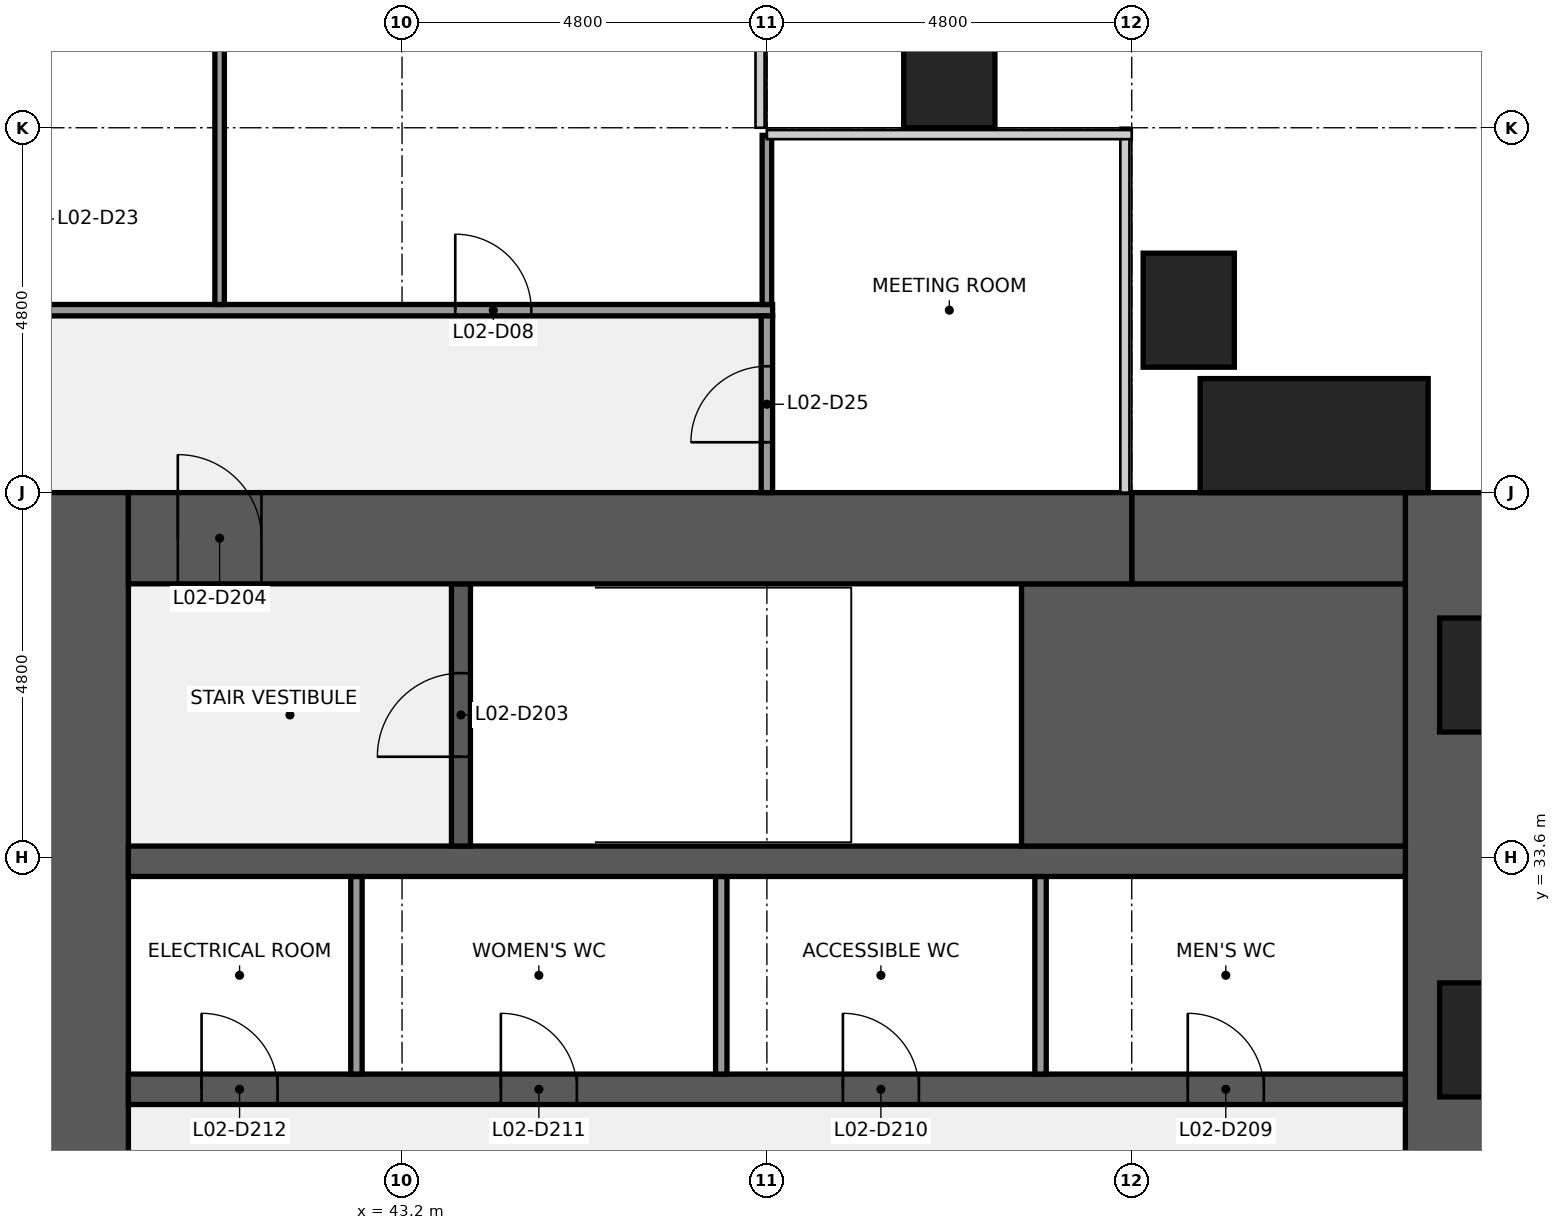
"""IFC4 building model, lengths in metres.
Left out: names, types, materials, properties, quantities, classifications, styles, units other than length and angle.
Written with IfcOpenShell. Run it as: python <this file> out.ifc"""

import sys

from ifc_helpers import new_model, si_unit, direction, frame, frame_2d, origin, origin_2d, place, context, subcontext, project, spatial, rectangle, extrude, element, fill, save


model = new_model("IFC4")
c1 = context("Model", 3, precision=1e-05, world=origin(), true_north=direction((0.0, 1.0)))
c2 = subcontext(c1, "Body", "Model", "MODEL_VIEW")
j1 = project(units=[si_unit("LENGTHUNIT", "METRE"), si_unit("PLANEANGLEUNIT", "RADIAN")], contexts=[c1])
p1 = place(None, origin())
s1 = spatial("IfcSite", under=j1, at=p1, CompositionType="ELEMENT")
p2 = place(p1, origin())
s2 = spatial("IfcBuilding", under=s1, at=p2, CompositionType="ELEMENT")
p3 = place(p2, frame((0.0, 0.0, 17.0)))
s3 = spatial("IfcBuildingStorey", under=s2, at=p3, CompositionType="ELEMENT", Elevation=17.0)
p4 = place(p3, frame((57.0, 38.4, 0.0), z_axis=(0.0, 0.0, 1.0), x_axis=(0.0, -1.0, 0.0)))
e1 = element("IfcWall", 1, at=p4, inside=s3, PredefinedType="SHEAR", context=c2, shape_type="SweptSolid", body=[
    extrude(rectangle(XDim=28.8, YDim=1.2, at=frame_2d((14.4, 0.0))), origin(), (0.0, 0.0, 1.0), 4.24),
])
p5 = place(p4, frame((18.45, 0.0, 0.9)))
e2 = element("IfcOpeningElement", 2, at=p5, cuts=e1, PredefinedType="OPENING", context=c2, shape_type="SweptSolid", body=[
    extrude(rectangle(XDim=1.5, YDim=1.5, at=frame_2d((0.75, 0.75))), frame((0.0, 0.61, 0.0), z_axis=(0.0, -1.0, 0.0), x_axis=(1.0, 0.0, 0.0)), (0.0, 0.0, 1.0), 1.22),
])
p6 = place(p4, frame((8.85, 0.0, 0.9)))
e3 = element("IfcOpeningElement", 3, at=p6, cuts=e1, PredefinedType="OPENING", context=c2, shape_type="SweptSolid", body=[
    extrude(rectangle(XDim=1.5, YDim=1.5, at=frame_2d((0.75, 0.75))), frame((0.0, 0.61, 0.0), z_axis=(0.0, -1.0, 0.0), x_axis=(1.0, 0.0, 0.0)), (0.0, 0.0, 1.0), 1.22),
])
p7 = place(p3, frame((39.0, 9.6, 0.0), z_axis=(0.0, 0.0, 1.0), x_axis=(0.0, 1.0, 0.0)))
e4 = element("IfcWall", 4, at=p7, inside=s3, PredefinedType="SHEAR", context=c2, shape_type="SweptSolid", body=[
    extrude(rectangle(XDim=28.8, YDim=1.2, at=frame_2d((14.4, 0.0))), origin(), (0.0, 0.0, 1.0), 4.24),
])
p8 = place(p7, frame((8.7, 0.0, 0.0)))
e5 = element("IfcOpeningElement", 5, at=p8, cuts=e4, PredefinedType="OPENING", context=c2, shape_type="SweptSolid", body=[
    extrude(rectangle(XDim=1.8, YDim=2.1, at=frame_2d((0.9, 1.05))), frame((0.0, 0.61, 0.0), z_axis=(0.0, -1.0, 0.0), x_axis=(1.0, 0.0, 0.0)), (0.0, 0.0, 1.0), 1.22),
])
p9 = place(p7, frame((18.3, 0.0, 0.0)))
e6 = element("IfcOpeningElement", 6, at=p9, cuts=e4, PredefinedType="OPENING", context=c2, shape_type="SweptSolid", body=[
    extrude(rectangle(XDim=1.8, YDim=2.1, at=frame_2d((0.9, 1.05))), frame((0.0, 0.61, 0.0), z_axis=(0.0, -1.0, 0.0), x_axis=(1.0, 0.0, 0.0)), (0.0, 0.0, 1.0), 1.22),
])
p10 = place(p3, frame((39.6, 30.55, 0.0), z_axis=(0.0, 0.0, 1.0), x_axis=(1.0, 0.0, 0.0)))
e7 = element("IfcWall", 7, at=p10, inside=s3, PredefinedType="SHEAR", context=c2, shape_type="SweptSolid", body=[
    extrude(rectangle(XDim=16.8, YDim=0.4, at=frame_2d((8.4, 0.0))), origin(), (0.0, 0.0, 1.0), 4.24),
])
p11 = place(p10, frame((13.938, 0.0, 0.0)))
e8 = element("IfcOpeningElement", 8, at=p11, cuts=e7, PredefinedType="OPENING", context=c2, shape_type="SweptSolid", body=[
    extrude(rectangle(XDim=1.0, YDim=2.1, at=frame_2d((0.5, 1.05))), frame((0.0, 0.21, 0.0), z_axis=(0.0, -1.0, 0.0), x_axis=(1.0, 0.0, 0.0)), (0.0, 0.0, 1.0), 0.42),
])
p12 = place(p10, frame((9.4, 0.0, 0.0)))
e9 = element("IfcOpeningElement", 9, at=p12, cuts=e7, PredefinedType="OPENING", context=c2, shape_type="SweptSolid", body=[
    extrude(rectangle(XDim=1.0, YDim=2.1, at=frame_2d((0.5, 1.05))), frame((0.0, 0.21, 0.0), z_axis=(0.0, -1.0, 0.0), x_axis=(1.0, 0.0, 0.0)), (0.0, 0.0, 1.0), 0.42),
])
p13 = place(p10, frame((4.9, 0.0, 0.0)))
e10 = element("IfcOpeningElement", 10, at=p13, cuts=e7, PredefinedType="OPENING", context=c2, shape_type="SweptSolid", body=[
    extrude(rectangle(XDim=1.0, YDim=2.1, at=frame_2d((0.5, 1.05))), frame((0.0, 0.21, 0.0), z_axis=(0.0, -1.0, 0.0), x_axis=(1.0, 0.0, 0.0)), (0.0, 0.0, 1.0), 0.42),
])
p14 = place(p10, frame((0.962, 0.0, 0.0)))
e11 = element("IfcOpeningElement", 11, at=p14, cuts=e7, PredefinedType="OPENING", context=c2, shape_type="SweptSolid", body=[
    extrude(rectangle(XDim=1.0, YDim=2.1, at=frame_2d((0.5, 1.05))), frame((0.0, 0.21, 0.0), z_axis=(0.0, -1.0, 0.0), x_axis=(1.0, 0.0, 0.0)), (0.0, 0.0, 1.0), 0.42),
])
for number, where, z_axis, x_axis in (
    (12, (51.6, 30.75, 0.0), (0.0, 0.0, 1.0), (0.0, 1.0, 0.0)),
    (13, (47.4, 30.75, 0.0), (0.0, 0.0, 1.0), (0.0, 1.0, 0.0)),
    (14, (42.6, 30.75, 0.0), (0.0, 0.0, 1.0), (0.0, 1.0, 0.0)),
):
    element("IfcWall", number, at=place(p3, frame(where, z_axis=z_axis, x_axis=x_axis)), inside=s3, PredefinedType="PARTITIONING", context=c2, shape_type="SweptSolid", body=[
        extrude(rectangle(XDim=2.6, YDim=0.15, at=frame_2d((1.3, 0.0))), origin(), (0.0, 0.0, 1.0), 4.24),
    ])
p15 = place(p3, frame((39.6, 33.55, 0.0), z_axis=(0.0, 0.0, 1.0), x_axis=(1.0, 0.0, 0.0)))
e15 = element("IfcWall", 15, at=p15, inside=s3, PredefinedType="SHEAR", context=c2, shape_type="SweptSolid", body=[
    extrude(rectangle(XDim=16.8, YDim=0.4, at=frame_2d((8.4, 0.0))), origin(), (0.0, 0.0, 1.0), 4.24),
])
p16 = place(p3, frame((51.35, 35.475, 0.0), z_axis=(0.0, 0.0, 1.0), x_axis=(1.0, 0.0, 0.0)))
e16 = element("IfcWall", 16, at=p16, inside=s3, PredefinedType="SHEAR", context=c2, shape_type="SweptSolid", body=[
    extrude(rectangle(XDim=5.05, YDim=3.45, at=frame_2d((2.525, 0.0))), origin(), (0.0, 0.0, 1.0), 4.24),
])
p17 = place(p3, frame((43.975, 33.75, 0.0), z_axis=(0.0, 0.0, 1.0), x_axis=(0.0, 1.0, 0.0)))
e17 = element("IfcWall", 17, at=p17, inside=s3, PredefinedType="SHEAR", context=c2, shape_type="SweptSolid", body=[
    extrude(rectangle(XDim=3.45, YDim=0.25, at=frame_2d((1.725, 0.0))), origin(), (0.0, 0.0, 1.0), 4.24),
])
p18 = place(p17, frame((1.175, 0.0, 0.0)))
e18 = element("IfcOpeningElement", 18, at=p18, cuts=e17, PredefinedType="OPENING", context=c2, shape_type="SweptSolid", body=[
    extrude(rectangle(XDim=1.1, YDim=2.1, at=frame_2d((0.55, 1.05))), frame((0.0, 0.135, 0.0), z_axis=(0.0, -1.0, 0.0), x_axis=(1.0, 0.0, 0.0)), (0.0, 0.0, 1.0), 0.27),
])
p19 = place(p3, frame((52.8, 37.8, 0.0), z_axis=(0.0, 0.0, 1.0), x_axis=(1.0, 0.0, 0.0)))
e19 = element("IfcWall", 19, at=p19, inside=s3, PredefinedType="SHEAR", context=c2, shape_type="SweptSolid", body=[
    extrude(rectangle(XDim=3.6, YDim=1.2, at=frame_2d((1.8, 0.0))), origin(), (0.0, 0.0, 1.0), 4.24),
])
p20 = place(p3, frame((39.6, 37.8, 0.0), z_axis=(0.0, 0.0, 1.0), x_axis=(1.0, 0.0, 0.0)))
e20 = element("IfcWall", 20, at=p20, inside=s3, PredefinedType="SHEAR", context=c2, shape_type="SweptSolid", body=[
    extrude(rectangle(XDim=13.2, YDim=1.2, at=frame_2d((6.6, 0.0))), origin(), (0.0, 0.0, 1.0), 4.24),
])
p21 = place(p20, frame((0.65, 0.0, 0.0)))
e21 = element("IfcOpeningElement", 21, at=p21, cuts=e20, PredefinedType="OPENING", context=c2, shape_type="SweptSolid", body=[
    extrude(rectangle(XDim=1.1, YDim=2.1, at=frame_2d((0.55, 1.05))), frame((0.0, 0.61, 0.0), z_axis=(0.0, -1.0, 0.0), x_axis=(1.0, 0.0, 0.0)), (0.0, 0.0, 1.0), 1.22),
])
p22 = place(p3, frame((38.325, 40.8, 0.0), z_axis=(0.0, 0.0, 1.0), x_axis=(1.0, 0.0, 0.0)))
e22 = element("IfcWall", 22, at=p22, inside=s3, PredefinedType="PARTITIONING", context=c2, shape_type="SweptSolid", body=[
    extrude(rectangle(XDim=9.75, YDim=0.15, at=frame_2d((4.875, 0.0))), origin(), (0.0, 0.0, 1.0), 3.25),
])
p23 = place(p22, frame((5.575, 0.0, 0.0)))
e23 = element("IfcOpeningElement", 23, at=p23, cuts=e22, PredefinedType="OPENING", context=c2, shape_type="SweptSolid", body=[
    extrude(rectangle(XDim=1.0, YDim=2.1, at=frame_2d((0.5, 1.05))), frame((0.0, 0.085, 0.0), z_axis=(0.0, -1.0, 0.0), x_axis=(1.0, 0.0, 0.0)), (0.0, 0.0, 1.0), 0.17),
])
p24 = place(p3, frame((40.8, 40.875, 0.0), z_axis=(0.0, 0.0, 1.0), x_axis=(0.0, 1.0, 0.0)))
e24 = element("IfcWall", 24, at=p24, inside=s3, PredefinedType="PARTITIONING", context=c2, shape_type="SweptSolid", body=[
    extrude(rectangle(XDim=7.025, YDim=0.125, at=frame_2d((3.512, 0.0))), origin(), (0.0, 0.0, 1.0), 3.25),
])
p25 = place(p3, frame((48.0, 40.875, 0.0), z_axis=(0.0, 0.0, 1.0), x_axis=(0.0, 1.0, 0.0)))
e25 = element("IfcWall", 25, at=p25, inside=s3, PredefinedType="PARTITIONING", context=c2, shape_type="SweptSolid", body=[
    extrude(rectangle(XDim=2.225, YDim=0.125, at=frame_2d((1.113, 0.0))), origin(), (0.0, 0.0, 1.0), 3.25),
])
p26 = place(p3, frame((48.0, 38.4, 0.0), z_axis=(0.0, 0.0, 1.0), x_axis=(0.0, 1.0, 0.0)))
e26 = element("IfcWall", 26, at=p26, inside=s3, PredefinedType="PARTITIONING", context=c2, shape_type="SweptSolid", body=[
    extrude(rectangle(XDim=2.325, YDim=0.15, at=frame_2d((1.163, 0.0))), origin(), (0.0, 0.0, 1.0), 3.25),
])
p27 = place(p26, frame((0.663, 0.0, 0.0)))
e27 = element("IfcOpeningElement", 27, at=p27, cuts=e26, PredefinedType="OPENING", context=c2, shape_type="SweptSolid", body=[
    extrude(rectangle(XDim=1.0, YDim=2.1, at=frame_2d((0.5, 1.05))), frame((0.0, 0.085, 0.0), z_axis=(0.0, -1.0, 0.0), x_axis=(1.0, 0.0, 0.0)), (0.0, 0.0, 1.0), 0.17),
])
for number, where, z_axis, x_axis in (
    (28, (53.55, 40.8, 0.0), (0.0, 0.0, 1.0), (0.0, 1.0, 0.0)),
    (29, (50.4, 43.95, 0.0), (0.0, 0.0, 1.0), (1.0, 0.0, 0.0)),
):
    element("IfcColumn", number, at=place(p3, frame(where, z_axis=z_axis, x_axis=x_axis)), inside=s3, PredefinedType="PILASTER", context=c2, shape_type="SweptSolid", body=[
        extrude(rectangle(XDim=1.2, YDim=1.5, at=origin_2d()), origin(), (0.0, 0.0, 1.0), 4.4),
    ])
p28 = place(p3, frame((55.2, 39.15, 0.0), z_axis=(0.0, 0.0, 1.0), x_axis=(1.0, 0.0, 0.0)))
e30 = element("IfcColumn", 30, at=p28, inside=s3, PredefinedType="PILASTER", context=c2, shape_type="SweptSolid", body=[
    extrude(rectangle(XDim=3.0, YDim=1.5, at=origin_2d()), origin(), (0.0, 0.0, 1.0), 4.4),
])
p29 = place(p18, origin())
e31 = element("IfcDoor", 31, at=p29, inside=s3, OperationType="SINGLE_SWING_LEFT", PredefinedType="DOOR", context=c2, shape_type="SweptSolid", body=[
    extrude(rectangle(XDim=1.1, YDim=2.1, at=frame_2d((0.55, 1.05))), frame((0.0, 0.025, 0.0), z_axis=(0.0, -1.0, 0.0), x_axis=(1.0, 0.0, 0.0)), (0.0, 0.0, 1.0), 0.05),
])
fill(e18, e31)
p30 = place(p21, origin())
e32 = element("IfcDoor", 32, at=p30, inside=s3, OperationType="SINGLE_SWING_LEFT", PredefinedType="DOOR", context=c2, shape_type="SweptSolid", body=[
    extrude(rectangle(XDim=1.1, YDim=2.1, at=frame_2d((0.55, 1.05))), frame((0.0, 0.025, 0.0), z_axis=(0.0, -1.0, 0.0), x_axis=(1.0, 0.0, 0.0)), (0.0, 0.0, 1.0), 0.05),
])
fill(e21, e32)
p31 = place(p11, origin())
e33 = element("IfcDoor", 33, at=p31, inside=s3, OperationType="SINGLE_SWING_LEFT", PredefinedType="DOOR", context=c2, shape_type="SweptSolid", body=[
    extrude(rectangle(XDim=1.0, YDim=2.1, at=frame_2d((0.5, 1.05))), frame((0.0, 0.025, 0.0), z_axis=(0.0, -1.0, 0.0), x_axis=(1.0, 0.0, 0.0)), (0.0, 0.0, 1.0), 0.05),
])
fill(e8, e33)
p32 = place(p12, origin())
e34 = element("IfcDoor", 34, at=p32, inside=s3, OperationType="SINGLE_SWING_LEFT", PredefinedType="DOOR", context=c2, shape_type="SweptSolid", body=[
    extrude(rectangle(XDim=1.0, YDim=2.1, at=frame_2d((0.5, 1.05))), frame((0.0, 0.025, 0.0), z_axis=(0.0, -1.0, 0.0), x_axis=(1.0, 0.0, 0.0)), (0.0, 0.0, 1.0), 0.05),
])
fill(e9, e34)
p33 = place(p13, origin())
e35 = element("IfcDoor", 35, at=p33, inside=s3, OperationType="SINGLE_SWING_LEFT", PredefinedType="DOOR", context=c2, shape_type="SweptSolid", body=[
    extrude(rectangle(XDim=1.0, YDim=2.1, at=frame_2d((0.5, 1.05))), frame((0.0, 0.025, 0.0), z_axis=(0.0, -1.0, 0.0), x_axis=(1.0, 0.0, 0.0)), (0.0, 0.0, 1.0), 0.05),
])
fill(e10, e35)
p34 = place(p14, origin())
e36 = element("IfcDoor", 36, at=p34, inside=s3, OperationType="SINGLE_SWING_LEFT", PredefinedType="DOOR", context=c2, shape_type="SweptSolid", body=[
    extrude(rectangle(XDim=1.0, YDim=2.1, at=frame_2d((0.5, 1.05))), frame((0.0, 0.025, 0.0), z_axis=(0.0, -1.0, 0.0), x_axis=(1.0, 0.0, 0.0)), (0.0, 0.0, 1.0), 0.05),
])
fill(e11, e36)
p35 = place(p23, origin())
e37 = element("IfcDoor", 37, at=p35, inside=s3, OperationType="SINGLE_SWING_LEFT", PredefinedType="DOOR", context=c2, shape_type="SweptSolid", body=[
    extrude(rectangle(XDim=1.0, YDim=2.1, at=frame_2d((0.5, 1.05))), frame((0.0, 0.025, 0.0), z_axis=(0.0, -1.0, 0.0), x_axis=(1.0, 0.0, 0.0)), (0.0, 0.0, 1.0), 0.05),
])
fill(e23, e37)
p36 = place(p27, origin())
e38 = element("IfcDoor", 38, at=p36, inside=s3, OperationType="SINGLE_SWING_LEFT", PredefinedType="DOOR", context=c2, shape_type="SweptSolid", body=[
    extrude(rectangle(XDim=1.0, YDim=2.1, at=frame_2d((0.5, 1.05))), frame((0.0, 0.025, 0.0), z_axis=(0.0, -1.0, 0.0), x_axis=(1.0, 0.0, 0.0)), (0.0, 0.0, 1.0), 0.05),
])
fill(e27, e38)
save(model, sys.argv[1])
